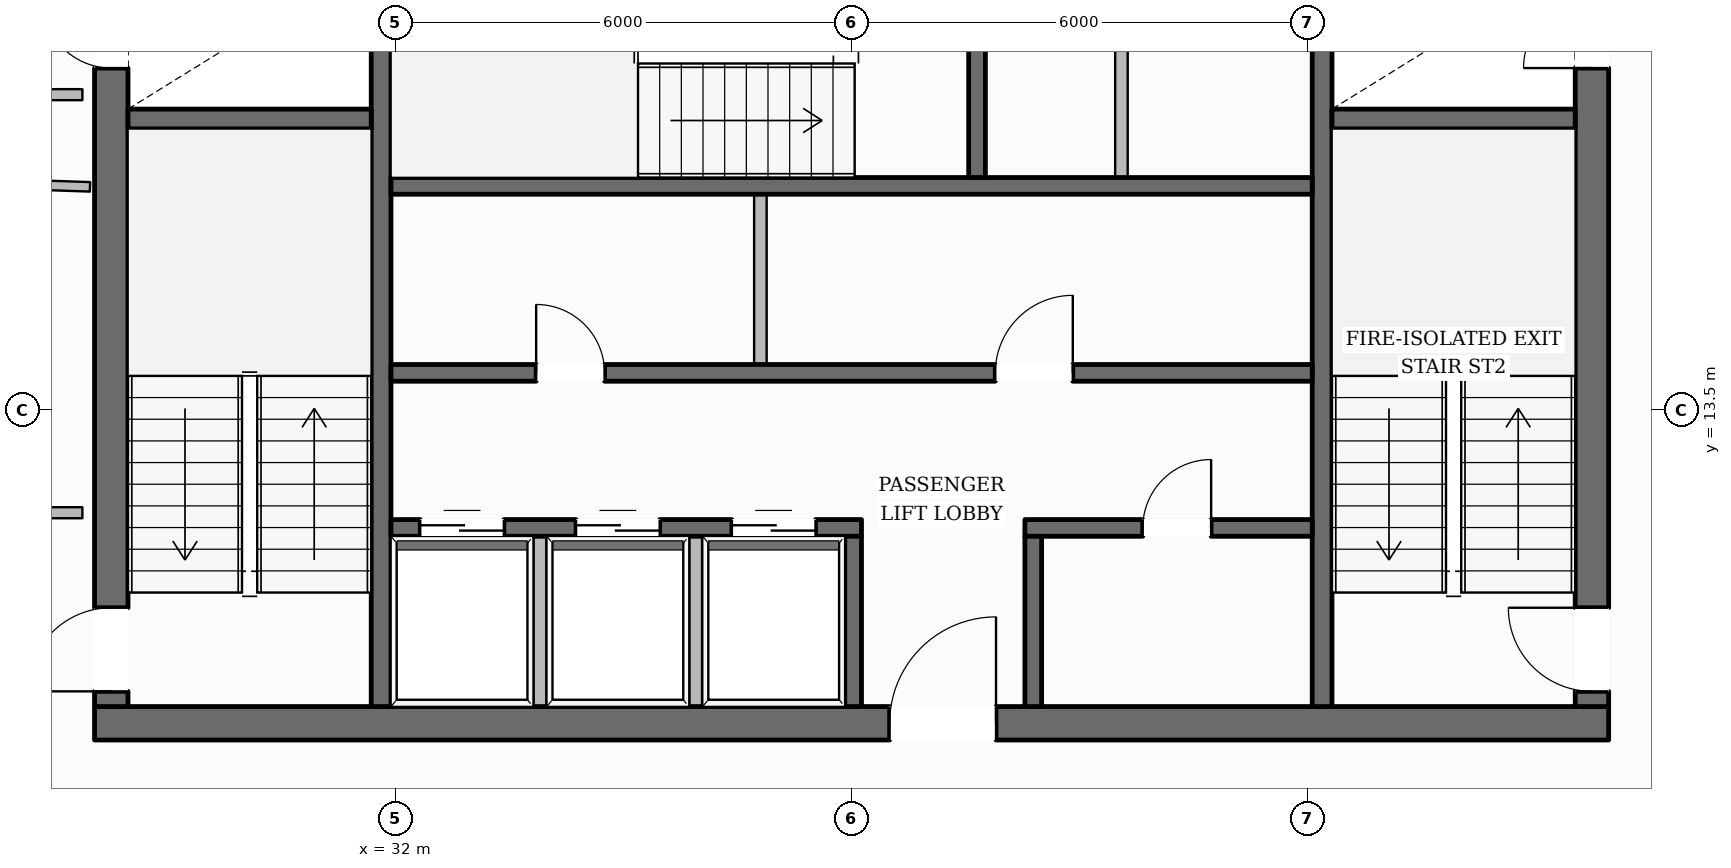
"""IFC4 building model, lengths in metres.
Left out: names, types, materials, properties, quantities, classifications, styles, units other than length and angle.
Written with IfcOpenShell. Run it as: python <this file> out.ifc"""

import sys

from ifc_helpers import new_model, si_unit, direction, frame, frame_2d, origin, place, context, subcontext, project, spatial, rectangle, extrude, element, fill, save


model = new_model("IFC4")
c1 = context("Model", 3, precision=1e-05, world=origin(), true_north=direction((0.0, 1.0)))
c2 = subcontext(c1, "Body", "Model", "MODEL_VIEW")
j1 = project(units=[si_unit("LENGTHUNIT", "METRE"), si_unit("PLANEANGLEUNIT", "RADIAN")], contexts=[c1])
p1 = place(None, origin())
s1 = spatial("IfcSite", under=j1, at=p1, CompositionType="ELEMENT")
p2 = place(p1, origin())
s2 = spatial("IfcBuilding", under=s1, at=p2, CompositionType="ELEMENT")
p3 = place(p2, frame((0.0, 0.0, 203.5)))
s3 = spatial("IfcBuildingStorey", under=s2, at=p3, CompositionType="ELEMENT", Elevation=203.5)
p4 = place(p3, frame((28.04, 9.38, 0.0), z_axis=(0.0, 0.0, 1.0), x_axis=(1.0, 0.0, 0.0)))
e1 = element("IfcWall", 1, at=p4, inside=s3, PredefinedType="SOLIDWALL", context=c2, shape_type="SweptSolid", body=[
    extrude(rectangle(XDim=19.92, YDim=0.44, at=frame_2d((9.96, 0.0))), origin(), (0.0, 0.0, 1.0), 3.6),
])
p5 = place(p4, frame((10.46, 0.0, 0.0)))
e2 = element("IfcOpeningElement", 2, at=p5, cuts=e1, PredefinedType="OPENING", context=c2, shape_type="SweptSolid", body=[
    extrude(rectangle(XDim=1.4, YDim=2.2, at=frame_2d((0.7, 1.1))), frame((0.0, 0.23, 0.0), z_axis=(0.0, -1.0, 0.0), x_axis=(1.0, 0.0, 0.0)), (0.0, 0.0, 1.0), 0.46),
])
p6 = place(p3, frame((28.26, 9.6, 0.0), z_axis=(0.0, 0.0, 1.0), x_axis=(0.0, 1.0, 0.0)))
e3 = element("IfcWall", 3, at=p6, inside=s3, PredefinedType="SOLIDWALL", context=c2, shape_type="SweptSolid", body=[
    extrude(rectangle(XDim=13.0, YDim=0.44, at=frame_2d((6.5, 0.0))), origin(), (0.0, 0.0, 1.0), 3.6),
])
p7 = place(p6, frame((0.2, 0.0, 0.0)))
e4 = element("IfcOpeningElement", 4, at=p7, cuts=e3, PredefinedType="OPENING", context=c2, shape_type="SweptSolid", body=[
    extrude(rectangle(XDim=1.1, YDim=2.15, at=frame_2d((0.55, 1.075))), frame((0.0, 0.23, 0.0), z_axis=(0.0, -1.0, 0.0), x_axis=(1.0, 0.0, 0.0)), (0.0, 0.0, 1.0), 0.46),
])
p8 = place(p6, frame((8.4, 0.0, 0.0)))
e5 = element("IfcOpeningElement", 5, at=p8, cuts=e3, PredefinedType="OPENING", context=c2, shape_type="SweptSolid", body=[
    extrude(rectangle(XDim=0.9, YDim=2.1, at=frame_2d((0.45, 1.05))), frame((0.0, 0.23, 0.0), z_axis=(0.0, -1.0, 0.0), x_axis=(1.0, 0.0, 0.0)), (0.0, 0.0, 1.0), 0.46),
])
p9 = place(p3, frame((47.74, 9.6, 0.0), z_axis=(0.0, 0.0, 1.0), x_axis=(0.0, 1.0, 0.0)))
e6 = element("IfcWall", 6, at=p9, inside=s3, PredefinedType="SOLIDWALL", context=c2, shape_type="SweptSolid", body=[
    extrude(rectangle(XDim=13.0, YDim=0.44, at=frame_2d((6.5, 0.0))), origin(), (0.0, 0.0, 1.0), 3.6),
])
p10 = place(p9, frame((0.2, 0.0, 0.0)))
e7 = element("IfcOpeningElement", 7, at=p10, cuts=e6, PredefinedType="OPENING", context=c2, shape_type="SweptSolid", body=[
    extrude(rectangle(XDim=1.1, YDim=2.15, at=frame_2d((0.55, 1.075))), frame((0.0, 0.23, 0.0), z_axis=(0.0, -1.0, 0.0), x_axis=(1.0, 0.0, 0.0)), (0.0, 0.0, 1.0), 0.46),
])
p11 = place(p9, frame((8.4, 0.0, 0.0)))
e8 = element("IfcOpeningElement", 8, at=p11, cuts=e6, PredefinedType="OPENING", context=c2, shape_type="SweptSolid", body=[
    extrude(rectangle(XDim=0.9, YDim=2.1, at=frame_2d((0.45, 1.05))), frame((0.0, 0.23, 0.0), z_axis=(0.0, -1.0, 0.0), x_axis=(1.0, 0.0, 0.0)), (0.0, 0.0, 1.0), 0.46),
])
p12 = place(p3, frame((31.81, 9.6, 0.0), z_axis=(0.0, 0.0, 1.0), x_axis=(0.0, 1.0, 0.0)))
e9 = element("IfcWall", 9, at=p12, inside=s3, PredefinedType="SHEAR", context=c2, shape_type="SweptSolid", body=[
    extrude(rectangle(XDim=13.0, YDim=0.26, at=frame_2d((6.5, 0.0))), origin(), (0.0, 0.0, 1.0), 3.6),
])
p13 = place(p12, frame((10.925, 0.0, 0.0)))
e10 = element("IfcOpeningElement", 10, at=p13, cuts=e9, PredefinedType="OPENING", context=c2, shape_type="SweptSolid", body=[
    extrude(rectangle(XDim=1.25, YDim=2.25, at=frame_2d((0.625, 1.125))), frame((0.0, 0.14, 0.0), z_axis=(0.0, -1.0, 0.0), x_axis=(1.0, 0.0, 0.0)), (0.0, 0.0, 1.0), 0.28),
])
p14 = place(p3, frame((44.19, 9.6, 0.0), z_axis=(0.0, 0.0, 1.0), x_axis=(0.0, 1.0, 0.0)))
e11 = element("IfcWall", 11, at=p14, inside=s3, PredefinedType="SHEAR", context=c2, shape_type="SweptSolid", body=[
    extrude(rectangle(XDim=13.0, YDim=0.26, at=frame_2d((6.5, 0.0))), origin(), (0.0, 0.0, 1.0), 3.6),
])
p15 = place(p14, frame((10.925, 0.0, 0.0)))
e12 = element("IfcOpeningElement", 12, at=p15, cuts=e11, PredefinedType="OPENING", context=c2, shape_type="SweptSolid", body=[
    extrude(rectangle(XDim=1.25, YDim=2.25, at=frame_2d((0.625, 1.125))), frame((0.0, 0.14, 0.0), z_axis=(0.0, -1.0, 0.0), x_axis=(1.0, 0.0, 0.0)), (0.0, 0.0, 1.0), 0.28),
])
for number, where, z_axis, x_axis in (
    (13, (28.48, 17.33, 0.0), (0.0, 0.0, 1.0), (1.0, 0.0, 0.0)),
    (14, (44.32, 17.33, 0.0), (0.0, 0.0, 1.0), (1.0, 0.0, 0.0)),
):
    element("IfcWall", number, at=place(p3, frame(where, z_axis=z_axis, x_axis=x_axis)), inside=s3, PredefinedType="SHEAR", context=c2, shape_type="SweptSolid", body=[
        extrude(rectangle(XDim=3.2, YDim=0.26, at=frame_2d((1.6, 0.0))), origin(), (0.0, 0.0, 1.0), 3.6),
    ])
p16 = place(p3, frame((31.94, 16.45, 0.0), z_axis=(0.0, 0.0, 1.0), x_axis=(1.0, 0.0, 0.0)))
e15 = element("IfcWall", 15, at=p16, inside=s3, PredefinedType="SOLIDWALL", context=c2, shape_type="SweptSolid", body=[
    extrude(rectangle(XDim=12.12, YDim=0.22, at=frame_2d((6.06, 0.0))), origin(), (0.0, 0.0, 1.0), 3.6),
])
p17 = place(p3, frame((39.65, 16.56, 0.0), z_axis=(0.0, 0.0, 1.0), x_axis=(0.0, 1.0, 0.0)))
e16 = element("IfcWall", 16, at=p17, inside=s3, PredefinedType="SOLIDWALL", context=c2, shape_type="SweptSolid", body=[
    extrude(rectangle(XDim=3.2, YDim=0.22, at=frame_2d((1.6, 0.0))), origin(), (0.0, 0.0, 1.0), 3.6),
])
p18 = place(p3, frame((31.94, 13.99, 0.0), z_axis=(0.0, 0.0, 1.0), x_axis=(1.0, 0.0, 0.0)))
e17 = element("IfcWall", 17, at=p18, inside=s3, PredefinedType="SOLIDWALL", context=c2, shape_type="SweptSolid", body=[
    extrude(rectangle(XDim=12.12, YDim=0.22, at=frame_2d((6.06, 0.0))), origin(), (0.0, 0.0, 1.0), 3.6),
])
p19 = place(p18, frame((1.91, 0.0, 0.0)))
e18 = element("IfcOpeningElement", 18, at=p19, cuts=e17, PredefinedType="OPENING", context=c2, shape_type="SweptSolid", body=[
    extrude(rectangle(XDim=0.9, YDim=2.1, at=frame_2d((0.45, 1.05))), frame((0.0, 0.12, 0.0), z_axis=(0.0, -1.0, 0.0), x_axis=(1.0, 0.0, 0.0)), (0.0, 0.0, 1.0), 0.24),
])
p20 = place(p18, frame((7.95, 0.0, 0.0)))
e19 = element("IfcOpeningElement", 19, at=p20, cuts=e17, PredefinedType="OPENING", context=c2, shape_type="SweptSolid", body=[
    extrude(rectangle(XDim=1.02, YDim=2.15, at=frame_2d((0.51, 1.075))), frame((0.0, 0.12, 0.0), z_axis=(0.0, -1.0, 0.0), x_axis=(1.0, 0.0, 0.0)), (0.0, 0.0, 1.0), 0.24),
])
p21 = place(p3, frame((31.94, 11.95, 0.0), z_axis=(0.0, 0.0, 1.0), x_axis=(1.0, 0.0, 0.0)))
e20 = element("IfcWall", 20, at=p21, inside=s3, PredefinedType="SOLIDWALL", context=c2, shape_type="SweptSolid", body=[
    extrude(rectangle(XDim=6.19, YDim=0.22, at=frame_2d((3.095, 0.0))), origin(), (0.0, 0.0, 1.0), 3.6),
])
p22 = place(p21, frame((0.385, 0.0, 0.0)))
e21 = element("IfcOpeningElement", 21, at=p22, cuts=e20, PredefinedType="OPENING", context=c2, shape_type="SweptSolid", body=[
    extrude(rectangle(XDim=1.1, YDim=2.2, at=frame_2d((0.55, 1.1))), frame((0.0, 0.12, 0.0), z_axis=(0.0, -1.0, 0.0), x_axis=(1.0, 0.0, 0.0)), (0.0, 0.0, 1.0), 0.24),
])
p23 = place(p21, frame((2.435, 0.0, 0.0)))
e22 = element("IfcOpeningElement", 22, at=p23, cuts=e20, PredefinedType="OPENING", context=c2, shape_type="SweptSolid", body=[
    extrude(rectangle(XDim=1.1, YDim=2.2, at=frame_2d((0.55, 1.1))), frame((0.0, 0.12, 0.0), z_axis=(0.0, -1.0, 0.0), x_axis=(1.0, 0.0, 0.0)), (0.0, 0.0, 1.0), 0.24),
])
p24 = place(p21, frame((4.485, 0.0, 0.0)))
e23 = element("IfcOpeningElement", 23, at=p24, cuts=e20, PredefinedType="OPENING", context=c2, shape_type="SweptSolid", body=[
    extrude(rectangle(XDim=1.1, YDim=2.2, at=frame_2d((0.55, 1.1))), frame((0.0, 0.12, 0.0), z_axis=(0.0, -1.0, 0.0), x_axis=(1.0, 0.0, 0.0)), (0.0, 0.0, 1.0), 0.24),
])
p25 = place(p3, frame((40.28, 11.95, 0.0), z_axis=(0.0, 0.0, 1.0), x_axis=(1.0, 0.0, 0.0)))
e24 = element("IfcWall", 24, at=p25, inside=s3, PredefinedType="SOLIDWALL", context=c2, shape_type="SweptSolid", body=[
    extrude(rectangle(XDim=3.78, YDim=0.22, at=frame_2d((1.89, 0.0))), origin(), (0.0, 0.0, 1.0), 3.6),
])
p26 = place(p25, frame((1.55, 0.0, 0.0)))
e25 = element("IfcOpeningElement", 25, at=p26, cuts=e24, PredefinedType="OPENING", context=c2, shape_type="SweptSolid", body=[
    extrude(rectangle(XDim=0.9, YDim=2.1, at=frame_2d((0.45, 1.05))), frame((0.0, 0.12, 0.0), z_axis=(0.0, -1.0, 0.0), x_axis=(1.0, 0.0, 0.0)), (0.0, 0.0, 1.0), 0.24),
])
for number, where, z_axis, x_axis in (
    (26, (38.02, 9.6, 0.0), (0.0, 0.0, 1.0), (0.0, 1.0, 0.0)),
    (27, (40.39, 9.6, 0.0), (0.0, 0.0, 1.0), (0.0, 1.0, 0.0)),
):
    element("IfcWall", number, at=place(p3, frame(where, z_axis=z_axis, x_axis=x_axis)), inside=s3, PredefinedType="SOLIDWALL", context=c2, shape_type="SweptSolid", body=[
        extrude(rectangle(XDim=2.24, YDim=0.22, at=frame_2d((1.12, 0.0))), origin(), (0.0, 0.0, 1.0), 3.6),
    ])
p27 = place(p3, frame((14.405, 11.157, 0.0), z_axis=(0.0, 0.0, 1.0), x_axis=(0.507147779291, 0.861859112593, 0.0)))
e28 = element("IfcWall", 28, at=p27, inside=s3, PredefinedType="STANDARD", context=c2, shape_type="SweptSolid", body=[
    extrude(rectangle(XDim=38.111, YDim=0.35, at=frame_2d((19.056, 0.0))), origin(), (0.0, 0.0, 1.0), 3.132),
])
p28 = place(p27, frame((33.816, 0.0, 0.65)))
e29 = element("IfcOpeningElement", 29, at=p28, cuts=e28, PredefinedType="OPENING", context=c2, shape_type="SweptSolid", body=[
    extrude(rectangle(XDim=1.45, YDim=1.75, at=frame_2d((0.725, 0.875))), frame((0.0, 0.185, 0.0), z_axis=(0.0, -1.0, 0.0), x_axis=(1.0, 0.0, 0.0)), (0.0, 0.0, 1.0), 0.37),
])
p29 = place(p27, frame((27.623, 0.0, 0.65)))
e30 = element("IfcOpeningElement", 30, at=p29, cuts=e28, PredefinedType="OPENING", context=c2, shape_type="SweptSolid", body=[
    extrude(rectangle(XDim=1.45, YDim=1.75, at=frame_2d((0.725, 0.875))), frame((0.0, 0.185, 0.0), z_axis=(0.0, -1.0, 0.0), x_axis=(1.0, 0.0, 0.0)), (0.0, 0.0, 1.0), 0.37),
])
p30 = place(p27, frame((15.239, 0.0, 0.65)))
e31 = element("IfcOpeningElement", 31, at=p30, cuts=e28, PredefinedType="OPENING", context=c2, shape_type="SweptSolid", body=[
    extrude(rectangle(XDim=1.45, YDim=1.75, at=frame_2d((0.725, 0.875))), frame((0.0, 0.185, 0.0), z_axis=(0.0, -1.0, 0.0), x_axis=(1.0, 0.0, 0.0)), (0.0, 0.0, 1.0), 0.37),
])
p31 = place(p27, frame((9.046, 0.0, 0.65)))
e32 = element("IfcOpeningElement", 32, at=p31, cuts=e28, PredefinedType="OPENING", context=c2, shape_type="SweptSolid", body=[
    extrude(rectangle(XDim=1.45, YDim=1.75, at=frame_2d((0.725, 0.875))), frame((0.0, 0.185, 0.0), z_axis=(0.0, -1.0, 0.0), x_axis=(1.0, 0.0, 0.0)), (0.0, 0.0, 1.0), 0.37),
])
p32 = place(p27, frame((2.854, 0.0, 0.65)))
e33 = element("IfcOpeningElement", 33, at=p32, cuts=e28, PredefinedType="OPENING", context=c2, shape_type="SweptSolid", body=[
    extrude(rectangle(XDim=1.45, YDim=1.75, at=frame_2d((0.725, 0.875))), frame((0.0, 0.185, 0.0), z_axis=(0.0, -1.0, 0.0), x_axis=(1.0, 0.0, 0.0)), (0.0, 0.0, 1.0), 0.37),
])
p33 = place(p3, frame((42.267, 44.004, 0.0), z_axis=(0.0, 0.0, 1.0), x_axis=(0.507147779291, -0.861859112593, 0.0)))
e34 = element("IfcWall", 34, at=p33, inside=s3, PredefinedType="STANDARD", context=c2, shape_type="SweptSolid", body=[
    extrude(rectangle(XDim=38.111, YDim=0.35, at=frame_2d((19.056, 0.0))), origin(), (0.0, 0.0, 1.0), 3.132),
])
p34 = place(p33, frame((33.808, 0.0, 0.65)))
e35 = element("IfcOpeningElement", 35, at=p34, cuts=e34, PredefinedType="OPENING", context=c2, shape_type="SweptSolid", body=[
    extrude(rectangle(XDim=1.45, YDim=1.75, at=frame_2d((0.725, 0.875))), frame((0.0, 0.185, 0.0), z_axis=(0.0, -1.0, 0.0), x_axis=(1.0, 0.0, 0.0)), (0.0, 0.0, 1.0), 0.37),
])
p35 = place(p33, frame((27.615, 0.0, 0.65)))
e36 = element("IfcOpeningElement", 36, at=p35, cuts=e34, PredefinedType="OPENING", context=c2, shape_type="SweptSolid", body=[
    extrude(rectangle(XDim=1.45, YDim=1.75, at=frame_2d((0.725, 0.875))), frame((0.0, 0.185, 0.0), z_axis=(0.0, -1.0, 0.0), x_axis=(1.0, 0.0, 0.0)), (0.0, 0.0, 1.0), 0.37),
])
p36 = place(p33, frame((15.231, 0.0, 0.65)))
e37 = element("IfcOpeningElement", 37, at=p36, cuts=e34, PredefinedType="OPENING", context=c2, shape_type="SweptSolid", body=[
    extrude(rectangle(XDim=1.45, YDim=1.75, at=frame_2d((0.725, 0.875))), frame((0.0, 0.185, 0.0), z_axis=(0.0, -1.0, 0.0), x_axis=(1.0, 0.0, 0.0)), (0.0, 0.0, 1.0), 0.37),
])
p37 = place(p33, frame((9.038, 0.0, 0.65)))
e38 = element("IfcOpeningElement", 38, at=p37, cuts=e34, PredefinedType="OPENING", context=c2, shape_type="SweptSolid", body=[
    extrude(rectangle(XDim=1.45, YDim=1.75, at=frame_2d((0.725, 0.875))), frame((0.0, 0.185, 0.0), z_axis=(0.0, -1.0, 0.0), x_axis=(1.0, 0.0, 0.0)), (0.0, 0.0, 1.0), 0.37),
])
p38 = place(p33, frame((2.846, 0.0, 0.65)))
e39 = element("IfcOpeningElement", 39, at=p38, cuts=e34, PredefinedType="OPENING", context=c2, shape_type="SweptSolid", body=[
    extrude(rectangle(XDim=1.45, YDim=1.75, at=frame_2d((0.725, 0.875))), frame((0.0, 0.185, 0.0), z_axis=(0.0, -1.0, 0.0), x_axis=(1.0, 0.0, 0.0)), (0.0, 0.0, 1.0), 0.37),
])
for number, where, z_axis, x_axis in (
    (40, (33.9, 9.52, 0.0), (0.0, 0.0, 1.0), (0.0, 1.0, 0.0)),
    (41, (35.95, 9.52, 0.0), (0.0, 0.0, 1.0), (0.0, 1.0, 0.0)),
):
    element("IfcWall", number, at=place(p3, frame(where, z_axis=z_axis, x_axis=x_axis)), inside=s3, PredefinedType="PARTITIONING", context=c2, shape_type="SweptSolid", body=[
        extrude(rectangle(XDim=2.32, YDim=0.165, at=frame_2d((1.16, 0.0))), origin(), (0.0, 0.0, 1.0), 3.6),
    ])
p39 = place(p3, frame((36.8, 14.1, 0.0), z_axis=(0.0, 0.0, 1.0), x_axis=(0.0, 1.0, 0.0)))
e42 = element("IfcWall", 42, at=p39, inside=s3, PredefinedType="PARTITIONING", context=c2, shape_type="SweptSolid", body=[
    extrude(rectangle(XDim=2.24, YDim=0.165, at=frame_2d((1.12, 0.0))), origin(), (0.0, 0.0, 1.0), 3.6),
])
p40 = place(p3, frame((41.55, 16.56, 0.0), z_axis=(0.0, 0.0, 1.0), x_axis=(0.0, 1.0, 0.0)))
e43 = element("IfcWall", 43, at=p40, inside=s3, PredefinedType="PARTITIONING", context=c2, shape_type="SweptSolid", body=[
    extrude(rectangle(XDim=3.2, YDim=0.165, at=frame_2d((1.6, 0.0))), origin(), (0.0, 0.0, 1.0), 3.6),
])
for number, where, z_axis, x_axis in (
    (44, (27.88, 17.65, 0.0), (0.0, 0.0, 1.0), (-1.0, 0.0, 0.0)),
    (45, (26.06, 12.15, 0.0), (0.0, 0.0, 1.0), (1.0, 0.0, 0.0)),
):
    element("IfcWall", number, at=place(p3, frame(where, z_axis=z_axis, x_axis=x_axis)), inside=s3, PredefinedType="PARTITIONING", context=c2, shape_type="SweptSolid", body=[
        extrude(rectangle(XDim=1.82, YDim=0.145, at=frame_2d((0.91, 0.0))), origin(), (0.0, 0.0, 1.0), 3.6),
    ])
p41 = place(p3, frame((27.98, 16.438, 0.0), z_axis=(0.0, 0.0, 1.0), x_axis=(-0.999433600002, 0.033652328114, 0.0)))
e46 = element("IfcWall", 46, at=p41, inside=s3, PredefinedType="PARTITIONING", context=c2, shape_type="SweptSolid", body=[
    extrude(rectangle(XDim=9.634, YDim=0.125, at=frame_2d((4.817, 0.0))), origin(), (0.0, 0.0, 1.0), 3.141),
])
p42 = place(p3, frame((28.541, 31.023, 0.0), z_axis=(0.0, 0.0, 1.0), x_axis=(-0.449722790535, -0.893168187786, 0.0)))
e47 = element("IfcWall", 47, at=p42, inside=s3, PredefinedType="PARTITIONING", context=c2, shape_type="SweptSolid", body=[
    extrude(rectangle(XDim=16.062, YDim=0.125, at=frame_2d((8.031, 0.0))), origin(), (0.0, 0.0, 1.0), 3.339),
])
p43 = place(p42, frame((7.548, 0.0, 0.0)))
e48 = element("IfcOpeningElement", 48, at=p43, cuts=e47, PredefinedType="OPENING", context=c2, shape_type="SweptSolid", body=[
    extrude(rectangle(XDim=0.98, YDim=2.15, at=frame_2d((0.49, 1.075))), frame((0.0, 0.073, 0.0), z_axis=(0.0, -1.0, 0.0), x_axis=(1.0, 0.0, 0.0)), (0.0, 0.0, 1.0), 0.145),
])
p44 = place(p7, origin())
e49 = element("IfcDoor", 49, at=p44, inside=s3, OperationType="SINGLE_SWING_LEFT", PredefinedType="DOOR", context=c2, shape_type="SweptSolid", body=[
    extrude(rectangle(XDim=1.1, YDim=2.15, at=frame_2d((0.55, 1.075))), frame((0.0, 0.025, 0.0), z_axis=(0.0, -1.0, 0.0), x_axis=(1.0, 0.0, 0.0)), (0.0, 0.0, 1.0), 0.05),
])
fill(e4, e49)
p45 = place(p10, origin())
e50 = element("IfcDoor", 50, at=p45, inside=s3, OperationType="SINGLE_SWING_RIGHT", PredefinedType="DOOR", context=c2, shape_type="SweptSolid", body=[
    extrude(rectangle(XDim=1.1, YDim=2.15, at=frame_2d((0.55, 1.075))), frame((0.0, 0.025, 0.0), z_axis=(0.0, -1.0, 0.0), x_axis=(1.0, 0.0, 0.0)), (0.0, 0.0, 1.0), 0.05),
])
fill(e7, e50)
p46 = place(p8, origin())
e51 = element("IfcDoor", 51, at=p46, inside=s3, OperationType="SINGLE_SWING_RIGHT", PredefinedType="DOOR", context=c2, shape_type="SweptSolid", body=[
    extrude(rectangle(XDim=0.9, YDim=2.1, at=frame_2d((0.45, 1.05))), frame((0.0, 0.025, 0.0), z_axis=(0.0, -1.0, 0.0), x_axis=(1.0, 0.0, 0.0)), (0.0, 0.0, 1.0), 0.05),
])
fill(e5, e51)
p47 = place(p11, origin())
e52 = element("IfcDoor", 52, at=p47, inside=s3, OperationType="SINGLE_SWING_LEFT", PredefinedType="DOOR", context=c2, shape_type="SweptSolid", body=[
    extrude(rectangle(XDim=0.9, YDim=2.1, at=frame_2d((0.45, 1.05))), frame((0.0, 0.025, 0.0), z_axis=(0.0, -1.0, 0.0), x_axis=(1.0, 0.0, 0.0)), (0.0, 0.0, 1.0), 0.05),
])
fill(e8, e52)
p48 = place(p5, origin())
e53 = element("IfcDoor", 53, at=p48, inside=s3, OperationType="SINGLE_SWING_RIGHT", PredefinedType="DOOR", context=c2, shape_type="SweptSolid", body=[
    extrude(rectangle(XDim=1.4, YDim=2.2, at=frame_2d((0.7, 1.1))), frame((0.0, 0.025, 0.0), z_axis=(0.0, -1.0, 0.0), x_axis=(1.0, 0.0, 0.0)), (0.0, 0.0, 1.0), 0.05),
])
fill(e2, e53)
p49 = place(p22, origin())
e54 = element("IfcDoor", 54, at=p49, inside=s3, OperationType="DOUBLE_DOOR_SLIDING", PredefinedType="DOOR", context=c2, shape_type="SweptSolid", body=[
    extrude(rectangle(XDim=1.1, YDim=2.2, at=frame_2d((0.55, 1.1))), frame((0.0, 0.025, 0.0), z_axis=(0.0, -1.0, 0.0), x_axis=(1.0, 0.0, 0.0)), (0.0, 0.0, 1.0), 0.05),
])
fill(e21, e54)
p50 = place(p23, origin())
e55 = element("IfcDoor", 55, at=p50, inside=s3, OperationType="DOUBLE_DOOR_SLIDING", PredefinedType="DOOR", context=c2, shape_type="SweptSolid", body=[
    extrude(rectangle(XDim=1.1, YDim=2.2, at=frame_2d((0.55, 1.1))), frame((0.0, 0.025, 0.0), z_axis=(0.0, -1.0, 0.0), x_axis=(1.0, 0.0, 0.0)), (0.0, 0.0, 1.0), 0.05),
])
fill(e22, e55)
p51 = place(p24, origin())
e56 = element("IfcDoor", 56, at=p51, inside=s3, OperationType="DOUBLE_DOOR_SLIDING", PredefinedType="DOOR", context=c2, shape_type="SweptSolid", body=[
    extrude(rectangle(XDim=1.1, YDim=2.2, at=frame_2d((0.55, 1.1))), frame((0.0, 0.025, 0.0), z_axis=(0.0, -1.0, 0.0), x_axis=(1.0, 0.0, 0.0)), (0.0, 0.0, 1.0), 0.05),
])
fill(e23, e56)
p52 = place(p19, origin())
e57 = element("IfcDoor", 57, at=p52, inside=s3, OperationType="SINGLE_SWING_LEFT", PredefinedType="DOOR", context=c2, shape_type="SweptSolid", body=[
    extrude(rectangle(XDim=0.9, YDim=2.1, at=frame_2d((0.45, 1.05))), frame((0.0, 0.025, 0.0), z_axis=(0.0, -1.0, 0.0), x_axis=(1.0, 0.0, 0.0)), (0.0, 0.0, 1.0), 0.05),
])
fill(e18, e57)
p53 = place(p20, origin())
e58 = element("IfcDoor", 58, at=p53, inside=s3, OperationType="SINGLE_SWING_RIGHT", PredefinedType="DOOR", context=c2, shape_type="SweptSolid", body=[
    extrude(rectangle(XDim=1.02, YDim=2.15, at=frame_2d((0.51, 1.075))), frame((0.0, 0.025, 0.0), z_axis=(0.0, -1.0, 0.0), x_axis=(1.0, 0.0, 0.0)), (0.0, 0.0, 1.0), 0.05),
])
fill(e19, e58)
p54 = place(p26, origin())
e59 = element("IfcDoor", 59, at=p54, inside=s3, OperationType="SINGLE_SWING_RIGHT", PredefinedType="DOOR", context=c2, shape_type="SweptSolid", body=[
    extrude(rectangle(XDim=0.9, YDim=2.1, at=frame_2d((0.45, 1.05))), frame((0.0, 0.025, 0.0), z_axis=(0.0, -1.0, 0.0), x_axis=(1.0, 0.0, 0.0)), (0.0, 0.0, 1.0), 0.05),
])
fill(e25, e59)
save(model, sys.argv[1])
